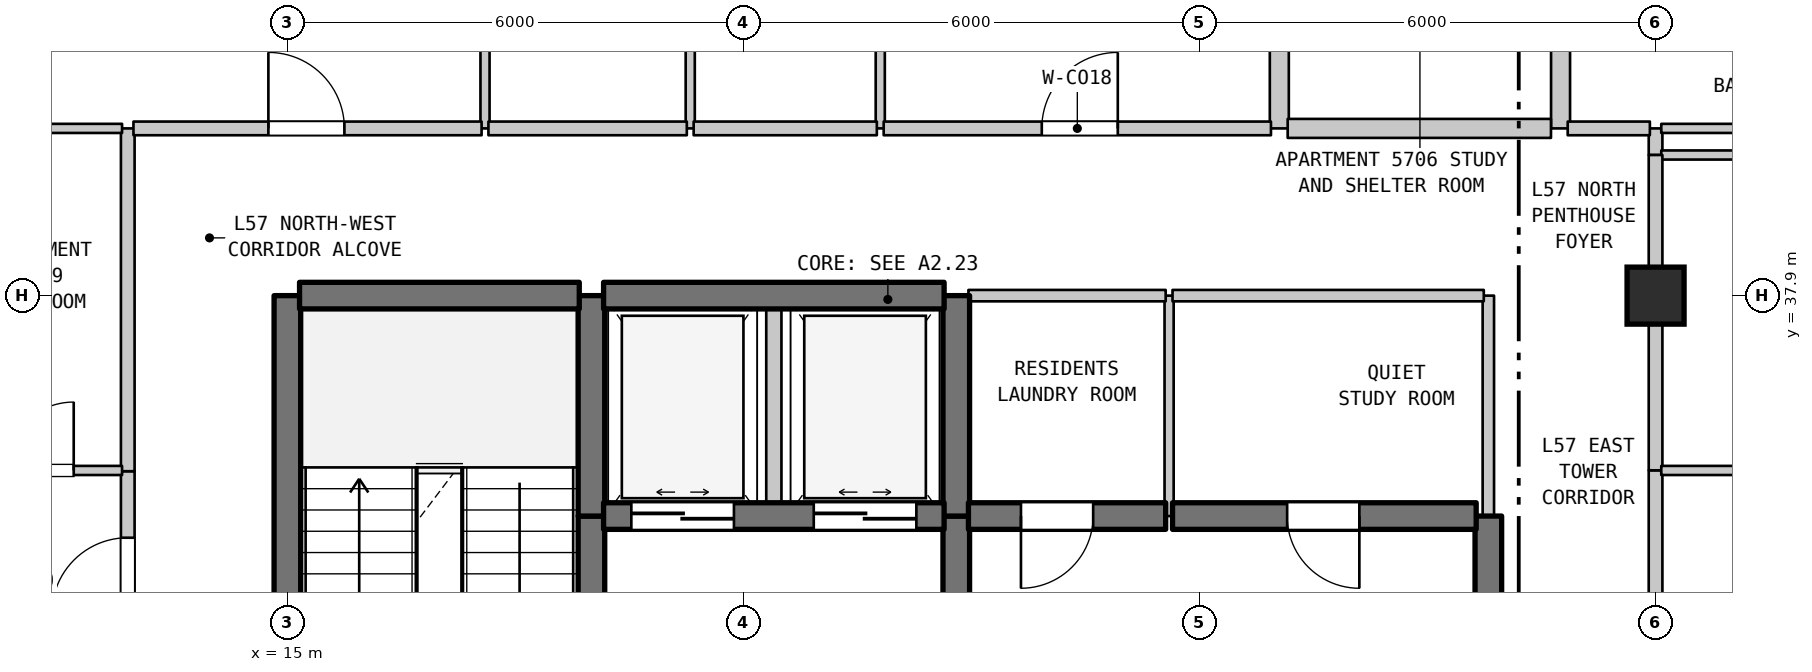
"""IFC4 building model, lengths in metres.
Left out: names, types, materials, properties, quantities, classifications, styles, units other than length and angle.
Written with IfcOpenShell. Run it as: python <this file> out.ifc"""

import sys

from ifc_helpers import new_model, si_unit, direction, frame, frame_2d, origin, origin_2d, place, context, subcontext, project, spatial, rectangle, extrude, element, fill, save


model = new_model("IFC4")
c1 = context("Model", 3, precision=1e-05, world=origin(), true_north=direction((0.0, 1.0)))
c2 = subcontext(c1, "Body", "Model", "MODEL_VIEW")
j1 = project(units=[si_unit("LENGTHUNIT", "METRE"), si_unit("PLANEANGLEUNIT", "RADIAN")], contexts=[c1])
p1 = place(None, origin())
s1 = spatial("IfcSite", under=j1, at=p1, CompositionType="ELEMENT")
p2 = place(p1, origin())
s2 = spatial("IfcBuilding", under=s1, at=p2, CompositionType="ELEMENT")
p3 = place(p2, frame((0.0, 0.0, 230.2)))
s3 = spatial("IfcBuildingStorey", under=s2, at=p3, CompositionType="ELEMENT", Elevation=230.2)
p4 = place(p3, frame((33.0, 37.9, 0.0), z_axis=(0.0, 0.0, 1.0), x_axis=(1.0, 0.0, 0.0)))
e1 = element("IfcColumn", 1, at=p4, inside=s3, PredefinedType="COLUMN", context=c2, shape_type="SweptSolid", body=[
    extrude(rectangle(XDim=0.75, YDim=0.75, at=origin_2d()), origin(), (0.0, 0.0, 1.0), 3.7),
])
p5 = place(p3, frame((12.9, 32.84, 0.0), z_axis=(0.0, 0.0, 1.0), x_axis=(0.0, 1.0, 0.0)))
e2 = element("IfcWall", 2, at=p5, inside=s3, PredefinedType="STANDARD", context=c2, shape_type="SweptSolid", body=[
    extrude(rectangle(XDim=2.75, YDim=0.18, at=frame_2d((1.375, 0.0))), origin(), (0.0, 0.0, 1.0), 3.39),
])
p6 = place(p5, frame((0.875, 0.0, 0.0)))
e3 = element("IfcOpeningElement", 3, at=p6, cuts=e2, PredefinedType="OPENING", context=c2, shape_type="SweptSolid", body=[
    extrude(rectangle(XDim=1.0, YDim=2.15, at=frame_2d((0.5, 1.075))), frame((0.0, 0.1, 0.0), z_axis=(0.0, -1.0, 0.0), x_axis=(1.0, 0.0, 0.0)), (0.0, 0.0, 1.0), 0.2),
])
p7 = place(p3, frame((12.9, 35.59, 0.0), z_axis=(0.0, 0.0, 1.0), x_axis=(0.0, 1.0, 0.0)))
e4 = element("IfcWall", 4, at=p7, inside=s3, PredefinedType="STANDARD", context=c2, shape_type="SweptSolid", body=[
    extrude(rectangle(XDim=4.51, YDim=0.18, at=frame_2d((2.255, 0.0))), origin(), (0.0, 0.0, 1.0), 3.39),
])
p8 = place(p3, frame((15.0, 31.1, 0.0), z_axis=(0.0, 0.0, 1.0), x_axis=(0.0, 1.0, 0.0)))
e5 = element("IfcWall", 5, at=p8, inside=s3, PredefinedType="SHEAR", context=c2, shape_type="SweptSolid", body=[
    extrude(rectangle(XDim=6.8, YDim=0.35, at=frame_2d((3.4, 0.0))), origin(), (0.0, 0.0, 1.0), 3.39),
])
p9 = place(p3, frame((17.6, 40.1, 0.0), z_axis=(0.0, 0.0, 1.0), x_axis=(0.0, 1.0, 0.0)))
e6 = element("IfcWall", 6, at=p9, inside=s3, PredefinedType="PARTITIONING", context=c2, shape_type="SweptSolid", body=[
    extrude(rectangle(XDim=3.2, YDim=0.12, at=frame_2d((1.6, 0.0))), origin(), (0.0, 0.0, 1.0), 3.39),
])
p10 = place(p3, frame((19.0, 29.5, 0.0), z_axis=(0.0, 0.0, 1.0), x_axis=(0.0, 1.0, 0.0)))
e7 = element("IfcWall", 7, at=p10, inside=s3, PredefinedType="SHEAR", context=c2, shape_type="SweptSolid", body=[
    extrude(rectangle(XDim=5.5, YDim=0.35, at=frame_2d((2.75, 0.0))), origin(), (0.0, 0.0, 1.0), 3.39),
])
p11 = place(p10, frame((2.025, 0.0, 0.0)))
e8 = element("IfcOpeningElement", 8, at=p11, cuts=e7, PredefinedType="OPENING", context=c2, shape_type="SweptSolid", body=[
    extrude(rectangle(XDim=1.1, YDim=2.15, at=frame_2d((0.55, 1.075))), frame((0.0, 0.185, 0.0), z_axis=(0.0, -1.0, 0.0), x_axis=(1.0, 0.0, 0.0)), (0.0, 0.0, 1.0), 0.37),
])
p12 = place(p3, frame((19.0, 35.0, 0.0), z_axis=(0.0, 0.0, 1.0), x_axis=(0.0, 1.0, 0.0)))
e9 = element("IfcWall", 9, at=p12, inside=s3, PredefinedType="SHEAR", context=c2, shape_type="SweptSolid", body=[
    extrude(rectangle(XDim=2.9, YDim=0.35, at=frame_2d((1.45, 0.0))), origin(), (0.0, 0.0, 1.0), 3.39),
])
p13 = place(p3, frame((20.3, 40.1, 0.0), z_axis=(0.0, 0.0, 1.0), x_axis=(0.0, 1.0, 0.0)))
e10 = element("IfcWall", 10, at=p13, inside=s3, PredefinedType="PARTITIONING", context=c2, shape_type="SweptSolid", body=[
    extrude(rectangle(XDim=3.2, YDim=0.12, at=frame_2d((1.6, 0.0))), origin(), (0.0, 0.0, 1.0), 3.39),
])
p14 = place(p13, frame((1.15, 0.0, 0.0)))
e11 = element("IfcOpeningElement", 11, at=p14, cuts=e10, PredefinedType="OPENING", context=c2, shape_type="SweptSolid", body=[
    extrude(rectangle(XDim=0.9, YDim=2.15, at=frame_2d((0.45, 1.075))), frame((0.0, 0.07, 0.0), z_axis=(0.0, -1.0, 0.0), x_axis=(1.0, 0.0, 0.0)), (0.0, 0.0, 1.0), 0.14),
])
p15 = place(p3, frame((21.4, 35.0, 0.0), z_axis=(0.0, 0.0, 1.0), x_axis=(0.0, 1.0, 0.0)))
e12 = element("IfcWall", 12, at=p15, inside=s3, PredefinedType="STANDARD", context=c2, shape_type="SweptSolid", body=[
    extrude(rectangle(XDim=2.9, YDim=0.2, at=frame_2d((1.45, 0.0))), origin(), (0.0, 0.0, 1.0), 3.39),
])
p16 = place(p3, frame((22.8, 40.1, 0.0), z_axis=(0.0, 0.0, 1.0), x_axis=(0.0, 1.0, 0.0)))
e13 = element("IfcWall", 13, at=p16, inside=s3, PredefinedType="PARTITIONING", context=c2, shape_type="SweptSolid", body=[
    extrude(rectangle(XDim=2.05, YDim=0.12, at=frame_2d((1.025, 0.0))), origin(), (0.0, 0.0, 1.0), 3.39),
])
p17 = place(p3, frame((23.8, 31.5, 0.0), z_axis=(0.0, 0.0, 1.0), x_axis=(0.0, 1.0, 0.0)))
e14 = element("IfcWall", 14, at=p17, inside=s3, PredefinedType="SHEAR", context=c2, shape_type="SweptSolid", body=[
    extrude(rectangle(XDim=3.5, YDim=0.35, at=frame_2d((1.75, 0.0))), origin(), (0.0, 0.0, 1.0), 3.39),
])
p18 = place(p17, frame((1.127, 0.0, 0.0)))
e15 = element("IfcOpeningElement", 15, at=p18, cuts=e14, PredefinedType="OPENING", context=c2, shape_type="SweptSolid", body=[
    extrude(rectangle(XDim=1.1, YDim=2.15, at=frame_2d((0.55, 1.075))), frame((0.0, 0.185, 0.0), z_axis=(0.0, -1.0, 0.0), x_axis=(1.0, 0.0, 0.0)), (0.0, 0.0, 1.0), 0.37),
])
p19 = place(p3, frame((23.8, 35.0, 0.0), z_axis=(0.0, 0.0, 1.0), x_axis=(0.0, 1.0, 0.0)))
e16 = element("IfcWall", 16, at=p19, inside=s3, PredefinedType="SHEAR", context=c2, shape_type="SweptSolid", body=[
    extrude(rectangle(XDim=2.9, YDim=0.35, at=frame_2d((1.45, 0.0))), origin(), (0.0, 0.0, 1.0), 3.39),
])
p20 = place(p3, frame((26.6, 35.0, 0.0), z_axis=(0.0, 0.0, 1.0), x_axis=(0.0, 1.0, 0.0)))
e17 = element("IfcWall", 17, at=p20, inside=s3, PredefinedType="PARTITIONING", context=c2, shape_type="SweptSolid", body=[
    extrude(rectangle(XDim=2.9, YDim=0.12, at=frame_2d((1.45, 0.0))), origin(), (0.0, 0.0, 1.0), 3.39),
])
p21 = place(p3, frame((28.05, 40.1, 0.0), z_axis=(0.0, 0.0, 1.0), x_axis=(0.0, 1.0, 0.0)))
e18 = element("IfcWall", 18, at=p21, inside=s3, PredefinedType="STANDARD", context=c2, shape_type="SweptSolid", body=[
    extrude(rectangle(XDim=2.3, YDim=0.25, at=frame_2d((1.15, 0.0))), origin(), (0.0, 0.0, 1.0), 3.39),
])
p22 = place(p3, frame((30.8, 31.5, 0.0), z_axis=(0.0, 0.0, 1.0), x_axis=(0.0, 1.0, 0.0)))
e19 = element("IfcWall", 19, at=p22, inside=s3, PredefinedType="SHEAR", context=c2, shape_type="SweptSolid", body=[
    extrude(rectangle(XDim=3.5, YDim=0.35, at=frame_2d((1.75, 0.0))), origin(), (0.0, 0.0, 1.0), 3.39),
])
p23 = place(p22, frame((1.15, 0.0, 0.0)))
e20 = element("IfcOpeningElement", 20, at=p23, cuts=e19, PredefinedType="OPENING", context=c2, shape_type="SweptSolid", body=[
    extrude(rectangle(XDim=1.2, YDim=2.2, at=frame_2d((0.6, 1.1))), frame((0.0, 0.185, 0.0), z_axis=(0.0, -1.0, 0.0), x_axis=(1.0, 0.0, 0.0)), (0.0, 0.0, 1.0), 0.37),
])
p24 = place(p3, frame((30.8, 35.0, 0.0), z_axis=(0.0, 0.0, 1.0), x_axis=(0.0, 1.0, 0.0)))
e21 = element("IfcWall", 21, at=p24, inside=s3, PredefinedType="STANDARD", context=c2, shape_type="SweptSolid", body=[
    extrude(rectangle(XDim=2.9, YDim=0.15, at=frame_2d((1.45, 0.0))), origin(), (0.0, 0.0, 1.0), 3.39),
])
p25 = place(p3, frame((31.75, 40.1, 0.0), z_axis=(0.0, 0.0, 1.0), x_axis=(0.0, 1.0, 0.0)))
e22 = element("IfcWall", 22, at=p25, inside=s3, PredefinedType="STANDARD", context=c2, shape_type="SweptSolid", body=[
    extrude(rectangle(XDim=2.3, YDim=0.25, at=frame_2d((1.15, 0.0))), origin(), (0.0, 0.0, 1.0), 3.39),
])
p26 = place(p3, frame((33.0, 32.186, 0.0), z_axis=(0.0, 0.0, 1.0), x_axis=(0.0, 1.0, 0.0)))
e23 = element("IfcWall", 23, at=p26, inside=s3, PredefinedType="STANDARD", context=c2, shape_type="SweptSolid", body=[
    extrude(rectangle(XDim=3.416, YDim=0.18, at=frame_2d((1.708, 0.0))), origin(), (0.0, 0.0, 1.0), 2.89),
])
p27 = place(p3, frame((33.0, 35.602, 0.0), z_axis=(0.0, 0.0, 1.0), x_axis=(0.0, 1.0, 0.0)))
e24 = element("IfcWall", 24, at=p27, inside=s3, PredefinedType="STANDARD", context=c2, shape_type="SweptSolid", body=[
    extrude(rectangle(XDim=2.298, YDim=0.18, at=frame_2d((1.149, 0.0))), origin(), (0.0, 0.0, 1.0), 2.89),
])
p28 = place(p3, frame((33.0, 39.75, 0.0), z_axis=(0.0, 0.0, 1.0), x_axis=(0.0, 1.0, 0.0)))
e25 = element("IfcWall", 25, at=p28, inside=s3, PredefinedType="STANDARD", context=c2, shape_type="SweptSolid", body=[
    extrude(rectangle(XDim=0.35, YDim=0.18, at=frame_2d((0.175, 0.0))), origin(), (0.0, 0.0, 1.0), 3.39),
])
p29 = place(p3, frame((19.16, 35.0, 0.0), z_axis=(0.0, 0.0, 1.0), x_axis=(1.0, 0.0, 0.0)))
e26 = element("IfcWall", 26, at=p29, inside=s3, PredefinedType="SHEAR", context=c2, shape_type="SweptSolid", body=[
    extrude(rectangle(XDim=4.48, YDim=0.35, at=frame_2d((2.24, 0.0))), origin(), (0.0, 0.0, 1.0), 3.39),
])
p30 = place(p29, frame((0.365, 0.0, 0.0)))
e27 = element("IfcOpeningElement", 27, at=p30, cuts=e26, PredefinedType="OPENING", context=c2, shape_type="SweptSolid", body=[
    extrude(rectangle(XDim=1.35, YDim=2.2, at=frame_2d((0.675, 1.1))), frame((0.0, 0.185, 0.0), z_axis=(0.0, -1.0, 0.0), x_axis=(1.0, 0.0, 0.0)), (0.0, 0.0, 1.0), 0.37),
])
p31 = place(p29, frame((2.765, 0.0, 0.0)))
e28 = element("IfcOpeningElement", 28, at=p31, cuts=e26, PredefinedType="OPENING", context=c2, shape_type="SweptSolid", body=[
    extrude(rectangle(XDim=1.35, YDim=2.2, at=frame_2d((0.675, 1.1))), frame((0.0, 0.185, 0.0), z_axis=(0.0, -1.0, 0.0), x_axis=(1.0, 0.0, 0.0)), (0.0, 0.0, 1.0), 0.37),
])
p32 = place(p3, frame((23.96, 35.0, 0.0), z_axis=(0.0, 0.0, 1.0), x_axis=(1.0, 0.0, 0.0)))
e29 = element("IfcWall", 29, at=p32, inside=s3, PredefinedType="SHEAR", context=c2, shape_type="SweptSolid", body=[
    extrude(rectangle(XDim=2.595, YDim=0.35, at=frame_2d((1.297, 0.0))), origin(), (0.0, 0.0, 1.0), 3.39),
])
p33 = place(p32, frame((0.691, 0.0, 0.0)))
e30 = element("IfcOpeningElement", 30, at=p33, cuts=e29, PredefinedType="OPENING", context=c2, shape_type="SweptSolid", body=[
    extrude(rectangle(XDim=0.95, YDim=2.15, at=frame_2d((0.475, 1.075))), frame((0.0, 0.185, 0.0), z_axis=(0.0, -1.0, 0.0), x_axis=(1.0, 0.0, 0.0)), (0.0, 0.0, 1.0), 0.37),
])
p34 = place(p3, frame((26.645, 35.0, 0.0), z_axis=(0.0, 0.0, 1.0), x_axis=(1.0, 0.0, 0.0)))
e31 = element("IfcWall", 31, at=p34, inside=s3, PredefinedType="SHEAR", context=c2, shape_type="SweptSolid", body=[
    extrude(rectangle(XDim=3.995, YDim=0.35, at=frame_2d((1.998, 0.0))), origin(), (0.0, 0.0, 1.0), 3.39),
])
p35 = place(p34, frame((1.508, 0.0, 0.0)))
e32 = element("IfcOpeningElement", 32, at=p35, cuts=e31, PredefinedType="OPENING", context=c2, shape_type="SweptSolid", body=[
    extrude(rectangle(XDim=0.95, YDim=2.15, at=frame_2d((0.475, 1.075))), frame((0.0, 0.185, 0.0), z_axis=(0.0, -1.0, 0.0), x_axis=(1.0, 0.0, 0.0)), (0.0, 0.0, 1.0), 0.37),
])
p36 = place(p3, frame((10.623, 35.6, 0.0), z_axis=(0.0, 0.0, 1.0), x_axis=(1.0, 0.0, 0.0)))
e33 = element("IfcWall", 33, at=p36, inside=s3, PredefinedType="PARTITIONING", context=c2, shape_type="SweptSolid", body=[
    extrude(rectangle(XDim=2.202, YDim=0.12, at=frame_2d((1.101, 0.0))), origin(), (0.0, 0.0, 1.0), 3.39),
])
p37 = place(p36, frame((0.666, 0.0, 0.0)))
e34 = element("IfcOpeningElement", 34, at=p37, cuts=e33, PredefinedType="OPENING", context=c2, shape_type="SweptSolid", body=[
    extrude(rectangle(XDim=0.9, YDim=2.1, at=frame_2d((0.45, 1.05))), frame((0.0, 0.07, 0.0), z_axis=(0.0, -1.0, 0.0), x_axis=(1.0, 0.0, 0.0)), (0.0, 0.0, 1.0), 0.14),
])
p38 = place(p3, frame((33.075, 35.6, 0.0), z_axis=(0.0, 0.0, 1.0), x_axis=(1.0, 0.0, 0.0)))
e35 = element("IfcWall", 35, at=p38, inside=s3, PredefinedType="PARTITIONING", context=c2, shape_type="SweptSolid", body=[
    extrude(rectangle(XDim=4.46, YDim=0.12, at=frame_2d((2.23, 0.0))), origin(), (0.0, 0.0, 1.0), 3.39),
])
p39 = place(p3, frame((15.16, 37.9, 0.0), z_axis=(0.0, 0.0, 1.0), x_axis=(1.0, 0.0, 0.0)))
e36 = element("IfcWall", 36, at=p39, inside=s3, PredefinedType="SHEAR", context=c2, shape_type="SweptSolid", body=[
    extrude(rectangle(XDim=3.68, YDim=0.35, at=frame_2d((1.84, 0.0))), origin(), (0.0, 0.0, 1.0), 3.39),
])
p40 = place(p3, frame((19.16, 37.9, 0.0), z_axis=(0.0, 0.0, 1.0), x_axis=(1.0, 0.0, 0.0)))
e37 = element("IfcWall", 37, at=p40, inside=s3, PredefinedType="SHEAR", context=c2, shape_type="SweptSolid", body=[
    extrude(rectangle(XDim=4.48, YDim=0.35, at=frame_2d((2.24, 0.0))), origin(), (0.0, 0.0, 1.0), 3.39),
])
p41 = place(p3, frame((23.96, 37.9, 0.0), z_axis=(0.0, 0.0, 1.0), x_axis=(1.0, 0.0, 0.0)))
e38 = element("IfcWall", 38, at=p41, inside=s3, PredefinedType="STANDARD", context=c2, shape_type="SweptSolid", body=[
    extrude(rectangle(XDim=2.595, YDim=0.15, at=frame_2d((1.297, 0.0))), origin(), (0.0, 0.0, 1.0), 2.89),
])
p42 = place(p3, frame((26.645, 37.9, 0.0), z_axis=(0.0, 0.0, 1.0), x_axis=(1.0, 0.0, 0.0)))
e39 = element("IfcWall", 39, at=p42, inside=s3, PredefinedType="STANDARD", context=c2, shape_type="SweptSolid", body=[
    extrude(rectangle(XDim=4.095, YDim=0.15, at=frame_2d((2.047, 0.0))), origin(), (0.0, 0.0, 1.0), 2.89),
])
p43 = place(p3, frame((33.075, 39.75, 0.0), z_axis=(0.0, 0.0, 1.0), x_axis=(1.0, 0.0, 0.0)))
e40 = element("IfcWall", 40, at=p43, inside=s3, PredefinedType="PARTITIONING", context=c2, shape_type="SweptSolid", body=[
    extrude(rectangle(XDim=4.46, YDim=0.12, at=frame_2d((2.23, 0.0))), origin(), (0.0, 0.0, 1.0), 3.39),
])
p44 = place(p3, frame((10.623, 40.1, 0.0), z_axis=(0.0, 0.0, 1.0), x_axis=(1.0, 0.0, 0.0)))
e41 = element("IfcWall", 41, at=p44, inside=s3, PredefinedType="PARTITIONING", context=c2, shape_type="SweptSolid", body=[
    extrude(rectangle(XDim=2.202, YDim=0.12, at=frame_2d((1.101, 0.0))), origin(), (0.0, 0.0, 1.0), 3.39),
])
p45 = place(p3, frame((12.975, 40.1, 0.0), z_axis=(0.0, 0.0, 1.0), x_axis=(1.0, 0.0, 0.0)))
e42 = element("IfcWall", 42, at=p45, inside=s3, PredefinedType="STANDARD", context=c2, shape_type="SweptSolid", body=[
    extrude(rectangle(XDim=4.58, YDim=0.18, at=frame_2d((2.29, 0.0))), origin(), (0.0, 0.0, 1.0), 3.39),
])
p46 = place(p45, frame((1.775, 0.0, 0.0)))
e43 = element("IfcOpeningElement", 43, at=p46, cuts=e42, PredefinedType="OPENING", context=c2, shape_type="SweptSolid", body=[
    extrude(rectangle(XDim=1.0, YDim=2.15, at=frame_2d((0.5, 1.075))), frame((0.0, 0.1, 0.0), z_axis=(0.0, -1.0, 0.0), x_axis=(1.0, 0.0, 0.0)), (0.0, 0.0, 1.0), 0.2),
])
p47 = place(p3, frame((17.645, 40.1, 0.0), z_axis=(0.0, 0.0, 1.0), x_axis=(1.0, 0.0, 0.0)))
e44 = element("IfcWall", 44, at=p47, inside=s3, PredefinedType="STANDARD", context=c2, shape_type="SweptSolid", body=[
    extrude(rectangle(XDim=2.61, YDim=0.18, at=frame_2d((1.305, 0.0))), origin(), (0.0, 0.0, 1.0), 3.39),
])
p48 = place(p3, frame((20.345, 40.1, 0.0), z_axis=(0.0, 0.0, 1.0), x_axis=(1.0, 0.0, 0.0)))
e45 = element("IfcWall", 45, at=p48, inside=s3, PredefinedType="STANDARD", context=c2, shape_type="SweptSolid", body=[
    extrude(rectangle(XDim=2.41, YDim=0.18, at=frame_2d((1.205, 0.0))), origin(), (0.0, 0.0, 1.0), 3.39),
])
p49 = place(p3, frame((22.845, 40.1, 0.0), z_axis=(0.0, 0.0, 1.0), x_axis=(1.0, 0.0, 0.0)))
e46 = element("IfcWall", 46, at=p49, inside=s3, PredefinedType="STANDARD", context=c2, shape_type="SweptSolid", body=[
    extrude(rectangle(XDim=5.095, YDim=0.18, at=frame_2d((2.547, 0.0))), origin(), (0.0, 0.0, 1.0), 3.39),
])
p50 = place(p49, frame((2.08, 0.0, 0.0)))
e47 = element("IfcOpeningElement", 47, at=p50, cuts=e46, PredefinedType="OPENING", context=c2, shape_type="SweptSolid", body=[
    extrude(rectangle(XDim=1.0, YDim=2.15, at=frame_2d((0.5, 1.075))), frame((0.0, 0.1, 0.0), z_axis=(0.0, -1.0, 0.0), x_axis=(1.0, 0.0, 0.0)), (0.0, 0.0, 1.0), 0.2),
])
p51 = place(p3, frame((28.16, 40.1, 0.0), z_axis=(0.0, 0.0, 1.0), x_axis=(1.0, 0.0, 0.0)))
e48 = element("IfcWall", 48, at=p51, inside=s3, PredefinedType="STANDARD", context=c2, shape_type="SweptSolid", body=[
    extrude(rectangle(XDim=3.464, YDim=0.25, at=frame_2d((1.732, 0.0))), origin(), (0.0, 0.0, 1.0), 3.39),
])
p52 = place(p3, frame((31.844, 40.1, 0.0), z_axis=(0.0, 0.0, 1.0), x_axis=(1.0, 0.0, 0.0)))
e49 = element("IfcWall", 49, at=p52, inside=s3, PredefinedType="STANDARD", context=c2, shape_type="SweptSolid", body=[
    extrude(rectangle(XDim=1.081, YDim=0.18, at=frame_2d((0.541, 0.0))), origin(), (0.0, 0.0, 1.0), 3.39),
])
p53 = place(p3, frame((33.075, 40.1, 0.0), z_axis=(0.0, 0.0, 1.0), x_axis=(1.0, 0.0, 0.0)))
e50 = element("IfcWall", 50, at=p53, inside=s3, PredefinedType="PARTITIONING", context=c2, shape_type="SweptSolid", body=[
    extrude(rectangle(XDim=2.171, YDim=0.12, at=frame_2d((1.085, 0.0))), origin(), (0.0, 0.0, 1.0), 3.39),
])
p54 = place(p3, frame((33.0, 37.9, 0.0), z_axis=(0.0, 0.0, 1.0), x_axis=(0.0, 1.0, 0.0)))
e51 = element("IfcWall", 51, at=p54, inside=s3, PredefinedType="STANDARD", context=c2, shape_type="SweptSolid", body=[
    extrude(rectangle(XDim=1.85, YDim=0.18, at=frame_2d((0.925, 0.0))), origin(), (0.0, 0.0, 1.0), 2.79),
])
p55 = place(p6, origin())
e52 = element("IfcDoor", 52, at=p55, inside=s3, OperationType="SINGLE_SWING_LEFT", PredefinedType="DOOR", context=c2, shape_type="SweptSolid", body=[
    extrude(rectangle(XDim=1.0, YDim=2.15, at=frame_2d((0.5, 1.075))), frame((0.0, 0.025, 0.0), z_axis=(0.0, -1.0, 0.0), x_axis=(1.0, 0.0, 0.0)), (0.0, 0.0, 1.0), 0.05),
])
fill(e3, e52)
p56 = place(p30, origin())
e53 = element("IfcDoor", 53, at=p56, inside=s3, OperationType="DOUBLE_DOOR_SLIDING", PredefinedType="DOOR", context=c2, shape_type="SweptSolid", body=[
    extrude(rectangle(XDim=1.35, YDim=2.2, at=frame_2d((0.675, 1.1))), frame((0.0, 0.025, 0.0), z_axis=(0.0, -1.0, 0.0), x_axis=(1.0, 0.0, 0.0)), (0.0, 0.0, 1.0), 0.05),
])
fill(e27, e53)
p57 = place(p31, origin())
e54 = element("IfcDoor", 54, at=p57, inside=s3, OperationType="DOUBLE_DOOR_SLIDING", PredefinedType="DOOR", context=c2, shape_type="SweptSolid", body=[
    extrude(rectangle(XDim=1.35, YDim=2.2, at=frame_2d((0.675, 1.1))), frame((0.0, 0.025, 0.0), z_axis=(0.0, -1.0, 0.0), x_axis=(1.0, 0.0, 0.0)), (0.0, 0.0, 1.0), 0.05),
])
fill(e28, e54)
p58 = place(p33, frame((0.95, 0.0, 0.0), z_axis=(0.0, 0.0, 1.0), x_axis=(-1.0, 0.0, 0.0)))
e55 = element("IfcDoor", 55, at=p58, inside=s3, OperationType="SINGLE_SWING_LEFT", PredefinedType="DOOR", context=c2, shape_type="SweptSolid", body=[
    extrude(rectangle(XDim=0.95, YDim=2.15, at=frame_2d((0.475, 1.075))), frame((0.0, 0.025, 0.0), z_axis=(0.0, -1.0, 0.0), x_axis=(1.0, 0.0, 0.0)), (0.0, 0.0, 1.0), 0.05),
])
fill(e30, e55)
p59 = place(p35, frame((0.95, 0.0, 0.0), z_axis=(0.0, 0.0, 1.0), x_axis=(-1.0, 0.0, 0.0)))
e56 = element("IfcDoor", 56, at=p59, inside=s3, OperationType="SINGLE_SWING_RIGHT", PredefinedType="DOOR", context=c2, shape_type="SweptSolid", body=[
    extrude(rectangle(XDim=0.95, YDim=2.15, at=frame_2d((0.475, 1.075))), frame((0.0, 0.025, 0.0), z_axis=(0.0, -1.0, 0.0), x_axis=(1.0, 0.0, 0.0)), (0.0, 0.0, 1.0), 0.05),
])
fill(e32, e56)
p60 = place(p37, origin())
e57 = element("IfcDoor", 57, at=p60, inside=s3, OperationType="SINGLE_SWING_RIGHT", PredefinedType="DOOR", context=c2, shape_type="SweptSolid", body=[
    extrude(rectangle(XDim=0.9, YDim=2.1, at=frame_2d((0.45, 1.05))), frame((0.0, 0.025, 0.0), z_axis=(0.0, -1.0, 0.0), x_axis=(1.0, 0.0, 0.0)), (0.0, 0.0, 1.0), 0.05),
])
fill(e34, e57)
p61 = place(p46, origin())
e58 = element("IfcDoor", 58, at=p61, inside=s3, OperationType="SINGLE_SWING_LEFT", PredefinedType="DOOR", context=c2, shape_type="SweptSolid", body=[
    extrude(rectangle(XDim=1.0, YDim=2.15, at=frame_2d((0.5, 1.075))), frame((0.0, 0.025, 0.0), z_axis=(0.0, -1.0, 0.0), x_axis=(1.0, 0.0, 0.0)), (0.0, 0.0, 1.0), 0.05),
])
fill(e43, e58)
p62 = place(p50, origin())
e59 = element("IfcDoor", 59, at=p62, inside=s3, OperationType="SINGLE_SWING_RIGHT", PredefinedType="DOOR", context=c2, shape_type="SweptSolid", body=[
    extrude(rectangle(XDim=1.0, YDim=2.15, at=frame_2d((0.5, 1.075))), frame((0.0, 0.025, 0.0), z_axis=(0.0, -1.0, 0.0), x_axis=(1.0, 0.0, 0.0)), (0.0, 0.0, 1.0), 0.05),
])
fill(e47, e59)
save(model, sys.argv[1])
